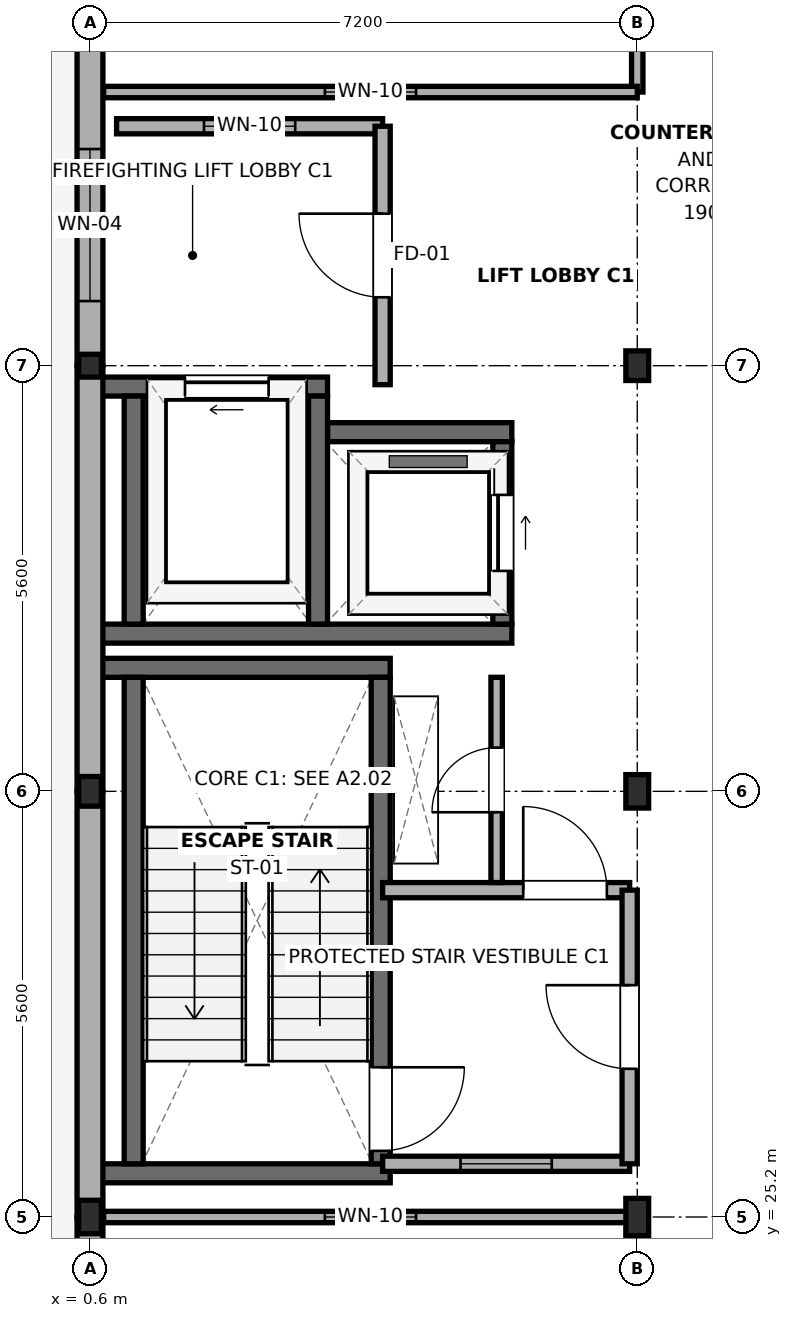
"""IFC4 building model, lengths in metres.
Left out: names, types, materials, properties, quantities, classifications, styles, units other than length and angle.
Written with IfcOpenShell. Run it as: python <this file> out.ifc"""

import sys

from ifc_helpers import new_model, si_unit, direction, frame, frame_2d, origin, origin_2d, place, context, subcontext, project, spatial, rectangle, i_section, extrude, element, fill, save


model = new_model("IFC4")
c1 = context("Model", 3, precision=1e-05, world=origin(), true_north=direction((0.0, 1.0)))
c2 = subcontext(c1, "Body", "Model", "MODEL_VIEW")
j1 = project(units=[si_unit("LENGTHUNIT", "METRE"), si_unit("PLANEANGLEUNIT", "RADIAN")], contexts=[c1])
p1 = place(None, origin())
s1 = spatial("IfcSite", under=j1, at=p1, CompositionType="ELEMENT")
p2 = place(p1, origin())
s2 = spatial("IfcBuilding", under=s1, at=p2, CompositionType="ELEMENT")
p3 = place(p2, frame((0.0, 0.0, 24.9)))
s3 = spatial("IfcBuildingStorey", under=s2, at=p3, CompositionType="ELEMENT", Elevation=24.9)
p4 = place(p3, frame((0.6, 25.2, 0.0), z_axis=(0.0, 0.0, 1.0), x_axis=(1.0, 0.0, 0.0)))
e1 = element("IfcColumn", 1, at=p4, inside=s3, PredefinedType="COLUMN", context=c2, shape_type="SweptSolid", body=[
    extrude(i_section(OverallWidth=0.3, OverallDepth=0.44, WebThickness=0.011, FlangeThickness=0.021, FilletRadius=0.027, at=origin_2d()), origin(), (0.0, 0.0, 1.0), 3.9),
])
p5 = place(p3, frame((0.6, 30.8, 0.0), z_axis=(0.0, 0.0, 1.0), x_axis=(1.0, 0.0, 0.0)))
e2 = element("IfcColumn", 2, at=p5, inside=s3, PredefinedType="COLUMN", context=c2, shape_type="SweptSolid", body=[
    extrude(i_section(OverallWidth=0.3, OverallDepth=0.39, WebThickness=0.011, FlangeThickness=0.019, FilletRadius=0.027, at=origin_2d()), origin(), (0.0, 0.0, 1.0), 3.9),
])
p6 = place(p3, frame((0.6, 36.4, 0.0), z_axis=(0.0, 0.0, 1.0), x_axis=(1.0, 0.0, 0.0)))
e3 = element("IfcColumn", 3, at=p6, inside=s3, PredefinedType="COLUMN", context=c2, shape_type="SweptSolid", body=[
    extrude(i_section(OverallWidth=0.3, OverallDepth=0.3, WebThickness=0.011, FlangeThickness=0.019, FilletRadius=0.027, at=origin_2d()), origin(), (0.0, 0.0, 1.0), 3.9),
])
p7 = place(p3, frame((7.8, 25.2, 0.0), z_axis=(0.0, 0.0, 1.0), x_axis=(1.0, 0.0, 0.0)))
e4 = element("IfcColumn", 4, at=p7, inside=s3, PredefinedType="COLUMN", context=c2, shape_type="SweptSolid", body=[
    extrude(i_section(OverallWidth=0.3, OverallDepth=0.49, WebThickness=0.012, FlangeThickness=0.023, FilletRadius=0.027, at=origin_2d()), origin(), (0.0, 0.0, 1.0), 3.9),
])
p8 = place(p3, frame((7.8, 30.8, 0.0), z_axis=(0.0, 0.0, 1.0), x_axis=(1.0, 0.0, 0.0)))
e5 = element("IfcColumn", 5, at=p8, inside=s3, PredefinedType="COLUMN", context=c2, shape_type="SweptSolid", body=[
    extrude(i_section(OverallWidth=0.3, OverallDepth=0.44, WebThickness=0.011, FlangeThickness=0.021, FilletRadius=0.027, at=origin_2d()), origin(), (0.0, 0.0, 1.0), 3.9),
])
p9 = place(p3, frame((7.8, 36.4, 0.0), z_axis=(0.0, 0.0, 1.0), x_axis=(1.0, 0.0, 0.0)))
e6 = element("IfcColumn", 6, at=p9, inside=s3, PredefinedType="COLUMN", context=c2, shape_type="SweptSolid", body=[
    extrude(i_section(OverallWidth=0.3, OverallDepth=0.39, WebThickness=0.011, FlangeThickness=0.019, FilletRadius=0.027, at=origin_2d()), origin(), (0.0, 0.0, 1.0), 3.9),
])
for number, where, z_axis, x_axis in (
    (7, (0.75, 25.775, 0.0), (0.0, 0.0, 1.0), (1.0, 0.0, 0.0)),
    (8, (0.75, 32.425, 0.0), (0.0, 0.0, 1.0), (1.0, 0.0, 0.0)),
):
    element("IfcWall", number, at=place(p3, frame(where, z_axis=z_axis, x_axis=x_axis)), inside=s3, PredefinedType="SHEAR", context=c2, shape_type="SweptSolid", body=[
        extrude(rectangle(XDim=3.8, YDim=0.25, at=frame_2d((1.9, 0.0))), origin(), (0.0, 0.0, 1.0), 3.72),
    ])
p10 = place(p3, frame((1.175, 25.9, 0.0), z_axis=(0.0, 0.0, 1.0), x_axis=(0.0, 1.0, 0.0)))
e9 = element("IfcWall", 9, at=p10, inside=s3, PredefinedType="SHEAR", context=c2, shape_type="SweptSolid", body=[
    extrude(rectangle(XDim=6.4, YDim=0.25, at=frame_2d((3.2, 0.0))), origin(), (0.0, 0.0, 1.0), 3.72),
])
p11 = place(p3, frame((4.425, 25.9, 0.0), z_axis=(0.0, 0.0, 1.0), x_axis=(0.0, 1.0, 0.0)))
e10 = element("IfcWall", 10, at=p11, inside=s3, PredefinedType="SHEAR", context=c2, shape_type="SweptSolid", body=[
    extrude(rectangle(XDim=6.4, YDim=0.25, at=frame_2d((3.2, 0.0))), origin(), (0.0, 0.0, 1.0), 3.72),
])
p12 = place(p11, frame((0.17, 0.0, 0.0)))
e11 = element("IfcOpeningElement", 11, at=p12, cuts=e10, PredefinedType="OPENING", context=c2, shape_type="SweptSolid", body=[
    extrude(rectangle(XDim=1.1, YDim=2.15, at=frame_2d((0.55, 1.075))), frame((0.0, 0.14, 0.0), z_axis=(0.0, -1.0, 0.0), x_axis=(1.0, 0.0, 0.0)), (0.0, 0.0, 1.0), 0.28),
])
p13 = place(p3, frame((0.75, 32.875, 0.0), z_axis=(0.0, 0.0, 1.0), x_axis=(1.0, 0.0, 0.0)))
e12 = element("IfcWall", 12, at=p13, inside=s3, PredefinedType="SHEAR", context=c2, shape_type="SweptSolid", body=[
    extrude(rectangle(XDim=5.4, YDim=0.25, at=frame_2d((2.7, 0.0))), origin(), (0.0, 0.0, 1.0), 3.72),
])
p14 = place(p3, frame((0.75, 36.125, 0.0), z_axis=(0.0, 0.0, 1.0), x_axis=(1.0, 0.0, 0.0)))
e13 = element("IfcWall", 13, at=p14, inside=s3, PredefinedType="SHEAR", context=c2, shape_type="SweptSolid", body=[
    extrude(rectangle(XDim=2.975, YDim=0.25, at=frame_2d((1.488, 0.0))), origin(), (0.0, 0.0, 1.0), 3.72),
])
p15 = place(p14, frame((1.1, 0.0, 0.0)))
e14 = element("IfcOpeningElement", 14, at=p15, cuts=e13, PredefinedType="OPENING", context=c2, shape_type="SweptSolid", body=[
    extrude(rectangle(XDim=1.1, YDim=2.15, at=frame_2d((0.55, 1.075))), frame((0.0, 0.14, 0.0), z_axis=(0.0, -1.0, 0.0), x_axis=(1.0, 0.0, 0.0)), (0.0, 0.0, 1.0), 0.28),
])
p16 = place(p3, frame((3.725, 35.525, 0.0), z_axis=(0.0, 0.0, 1.0), x_axis=(1.0, 0.0, 0.0)))
e15 = element("IfcWall", 15, at=p16, inside=s3, PredefinedType="SHEAR", context=c2, shape_type="SweptSolid", body=[
    extrude(rectangle(XDim=2.425, YDim=0.25, at=frame_2d((1.212, 0.0))), origin(), (0.0, 0.0, 1.0), 3.72),
])
for number, where, z_axis, x_axis in (
    (16, (1.175, 33.0, 0.0), (0.0, 0.0, 1.0), (0.0, 1.0, 0.0)),
    (17, (3.6, 33.0, 0.0), (0.0, 0.0, 1.0), (0.0, 1.0, 0.0)),
):
    element("IfcWall", number, at=place(p3, frame(where, z_axis=z_axis, x_axis=x_axis)), inside=s3, PredefinedType="SHEAR", context=c2, shape_type="SweptSolid", body=[
        extrude(rectangle(XDim=3.0, YDim=0.25, at=frame_2d((1.5, 0.0))), origin(), (0.0, 0.0, 1.0), 3.72),
    ])
p17 = place(p3, frame((6.025, 33.0, 0.0), z_axis=(0.0, 0.0, 1.0), x_axis=(0.0, 1.0, 0.0)))
e18 = element("IfcWall", 18, at=p17, inside=s3, PredefinedType="SHEAR", context=c2, shape_type="SweptSolid", body=[
    extrude(rectangle(XDim=2.4, YDim=0.25, at=frame_2d((1.2, 0.0))), origin(), (0.0, 0.0, 1.0), 3.72),
])
p18 = place(p17, frame((0.7, 0.0, 0.0)))
e19 = element("IfcOpeningElement", 19, at=p18, cuts=e18, PredefinedType="OPENING", context=c2, shape_type="SweptSolid", body=[
    extrude(rectangle(XDim=1.0, YDim=2.15, at=frame_2d((0.5, 1.075))), frame((0.0, 0.14, 0.0), z_axis=(0.0, -1.0, 0.0), x_axis=(1.0, 0.0, 0.0)), (0.0, 0.0, 1.0), 0.28),
])
p19 = place(p3, frame((0.6, 17.23, 0.0), z_axis=(0.0, 0.0, 1.0), x_axis=(0.0, 1.0, 0.0)))
e20 = element("IfcWall", 20, at=p19, inside=s3, PredefinedType="SOLIDWALL", context=c2, shape_type="SweptSolid", body=[
    extrude(rectangle(XDim=7.97, YDim=0.34, at=frame_2d((3.985, 0.0))), origin(), (0.0, 0.0, 1.0), 3.115),
])
p20 = place(p3, frame((0.6, 25.2, 0.0), z_axis=(0.0, 0.0, 1.0), x_axis=(0.0, 1.0, 0.0)))
e21 = element("IfcWall", 21, at=p20, inside=s3, PredefinedType="SOLIDWALL", context=c2, shape_type="SweptSolid", body=[
    extrude(rectangle(XDim=5.6, YDim=0.34, at=frame_2d((2.8, 0.0))), origin(), (0.0, 0.0, 1.0), 3.115),
])
p21 = place(p3, frame((0.6, 30.8, 0.0), z_axis=(0.0, 0.0, 1.0), x_axis=(0.0, 1.0, 0.0)))
e22 = element("IfcWall", 22, at=p21, inside=s3, PredefinedType="SOLIDWALL", context=c2, shape_type="SweptSolid", body=[
    extrude(rectangle(XDim=5.6, YDim=0.34, at=frame_2d((2.8, 0.0))), origin(), (0.0, 0.0, 1.0), 3.165),
])
p22 = place(p3, frame((0.6, 36.4, 0.0), z_axis=(0.0, 0.0, 1.0), x_axis=(0.0, 1.0, 0.0)))
e23 = element("IfcWall", 23, at=p22, inside=s3, PredefinedType="SOLIDWALL", context=c2, shape_type="SweptSolid", body=[
    extrude(rectangle(XDim=5.6, YDim=0.34, at=frame_2d((2.8, 0.0))), origin(), (0.0, 0.0, 1.0), 3.215),
])
p23 = place(p22, frame((0.85, 0.0, 0.9)))
e24 = element("IfcOpeningElement", 24, at=p23, cuts=e23, PredefinedType="OPENING", context=c2, shape_type="SweptSolid", body=[
    extrude(rectangle(XDim=2.0, YDim=1.8, at=frame_2d((1.0, 0.9))), frame((0.0, 0.185, 0.0), z_axis=(0.0, -1.0, 0.0), x_axis=(1.0, 0.0, 0.0)), (0.0, 0.0, 1.0), 0.37),
])
p24 = place(p3, frame((0.95, 39.55, 0.0), z_axis=(0.0, 0.0, 1.0), x_axis=(1.0, 0.0, 0.0)))
e25 = element("IfcWall", 25, at=p24, inside=s3, PredefinedType="PARTITIONING", context=c2, shape_type="SweptSolid", body=[
    extrude(rectangle(XDim=3.5, YDim=0.2, at=frame_2d((1.75, 0.0))), origin(), (0.0, 0.0, 1.0), 3.715),
])
p25 = place(p24, frame((1.15, 0.0, 0.95)))
e26 = element("IfcOpeningElement", 26, at=p25, cuts=e25, PredefinedType="OPENING", context=c2, shape_type="SweptSolid", body=[
    extrude(rectangle(XDim=1.2, YDim=1.5, at=frame_2d((0.6, 0.75))), frame((0.0, 0.115, 0.0), z_axis=(0.0, -1.0, 0.0), x_axis=(1.0, 0.0, 0.0)), (0.0, 0.0, 1.0), 0.23),
])
p26 = place(p3, frame((4.45, 36.15, 0.0), z_axis=(0.0, 0.0, 1.0), x_axis=(0.0, 1.0, 0.0)))
e27 = element("IfcWall", 27, at=p26, inside=s3, PredefinedType="PARTITIONING", context=c2, shape_type="SweptSolid", body=[
    extrude(rectangle(XDim=3.4, YDim=0.2, at=frame_2d((1.7, 0.0))), origin(), (0.0, 0.0, 1.0), 3.265),
])
p27 = place(p26, frame((1.15, 0.0, 0.0)))
e28 = element("IfcOpeningElement", 28, at=p27, cuts=e27, PredefinedType="OPENING", context=c2, shape_type="SweptSolid", body=[
    extrude(rectangle(XDim=1.1, YDim=2.15, at=frame_2d((0.55, 1.075))), frame((0.0, 0.115, 0.0), z_axis=(0.0, -1.0, 0.0), x_axis=(1.0, 0.0, 0.0)), (0.0, 0.0, 1.0), 0.23),
])
p28 = place(p3, frame((4.45, 25.9, 0.0), z_axis=(0.0, 0.0, 1.0), x_axis=(1.0, 0.0, 0.0)))
e29 = element("IfcWall", 29, at=p28, inside=s3, PredefinedType="PARTITIONING", context=c2, shape_type="SweptSolid", body=[
    extrude(rectangle(XDim=3.25, YDim=0.2, at=frame_2d((1.625, 0.0))), origin(), (0.0, 0.0, 1.0), 3.215),
])
p29 = place(p28, frame((1.025, 0.0, 0.95)))
e30 = element("IfcOpeningElement", 30, at=p29, cuts=e29, PredefinedType="OPENING", context=c2, shape_type="SweptSolid", body=[
    extrude(rectangle(XDim=1.2, YDim=1.5, at=frame_2d((0.6, 0.75))), frame((0.0, 0.115, 0.0), z_axis=(0.0, -1.0, 0.0), x_axis=(1.0, 0.0, 0.0)), (0.0, 0.0, 1.0), 0.23),
])
p30 = place(p3, frame((4.45, 29.5, 0.0), z_axis=(0.0, 0.0, 1.0), x_axis=(1.0, 0.0, 0.0)))
e31 = element("IfcWall", 31, at=p30, inside=s3, PredefinedType="PARTITIONING", context=c2, shape_type="SweptSolid", body=[
    extrude(rectangle(XDim=3.25, YDim=0.2, at=frame_2d((1.625, 0.0))), origin(), (0.0, 0.0, 1.0), 3.215),
])
p31 = place(p30, frame((1.85, 0.0, 0.0)))
e32 = element("IfcOpeningElement", 32, at=p31, cuts=e31, PredefinedType="OPENING", context=c2, shape_type="SweptSolid", body=[
    extrude(rectangle(XDim=1.1, YDim=2.15, at=frame_2d((0.55, 1.075))), frame((0.0, 0.115, 0.0), z_axis=(0.0, -1.0, 0.0), x_axis=(1.0, 0.0, 0.0)), (0.0, 0.0, 1.0), 0.23),
])
p32 = place(p3, frame((7.7, 25.9, 0.0), z_axis=(0.0, 0.0, 1.0), x_axis=(0.0, 1.0, 0.0)))
e33 = element("IfcWall", 33, at=p32, inside=s3, PredefinedType="PARTITIONING", context=c2, shape_type="SweptSolid", body=[
    extrude(rectangle(XDim=3.6, YDim=0.2, at=frame_2d((1.8, 0.0))), origin(), (0.0, 0.0, 1.0), 3.215),
])
p33 = place(p32, frame((1.25, 0.0, 0.0)))
e34 = element("IfcOpeningElement", 34, at=p33, cuts=e33, PredefinedType="OPENING", context=c2, shape_type="SweptSolid", body=[
    extrude(rectangle(XDim=1.1, YDim=2.15, at=frame_2d((0.55, 1.075))), frame((0.0, 0.115, 0.0), z_axis=(0.0, -1.0, 0.0), x_axis=(1.0, 0.0, 0.0)), (0.0, 0.0, 1.0), 0.23),
])
p34 = place(p3, frame((5.95, 29.6, 0.0), z_axis=(0.0, 0.0, 1.0), x_axis=(0.0, 1.0, 0.0)))
e35 = element("IfcWall", 35, at=p34, inside=s3, PredefinedType="PARTITIONING", context=c2, shape_type="SweptSolid", body=[
    extrude(rectangle(XDim=2.7, YDim=0.15, at=frame_2d((1.35, 0.0))), origin(), (0.0, 0.0, 1.0), 3.715),
])
p35 = place(p34, frame((0.925, 0.0, 0.0)))
e36 = element("IfcOpeningElement", 36, at=p35, cuts=e35, PredefinedType="OPENING", context=c2, shape_type="SweptSolid", body=[
    extrude(rectangle(XDim=0.85, YDim=2.1, at=frame_2d((0.425, 1.05))), frame((0.0, 0.09, 0.0), z_axis=(0.0, -1.0, 0.0), x_axis=(1.0, 0.0, 0.0)), (0.0, 0.0, 1.0), 0.18),
])
p36 = place(p3, frame((7.8, 17.56, 0.0), z_axis=(0.0, 0.0, 1.0), x_axis=(0.0, 1.0, 0.0)))
e37 = element("IfcWall", 37, at=p36, inside=s3, PredefinedType="PARTITIONING", context=c2, shape_type="SweptSolid", body=[
    extrude(rectangle(XDim=7.64, YDim=0.15, at=frame_2d((3.82, 0.0))), origin(), (0.0, 0.0, 1.0), 3.165),
])
p37 = place(p36, frame((3.295, 0.0, 0.0)))
e38 = element("IfcOpeningElement", 38, at=p37, cuts=e37, PredefinedType="OPENING", context=c2, shape_type="SweptSolid", body=[
    extrude(rectangle(XDim=1.05, YDim=2.15, at=frame_2d((0.525, 1.075))), frame((0.0, 0.09, 0.0), z_axis=(0.0, -1.0, 0.0), x_axis=(1.0, 0.0, 0.0)), (0.0, 0.0, 1.0), 0.18),
])
p38 = place(p3, frame((0.78, 25.2, 0.0), z_axis=(0.0, 0.0, 1.0), x_axis=(1.0, 0.0, 0.0)))
e39 = element("IfcWall", 39, at=p38, inside=s3, PredefinedType="PARTITIONING", context=c2, shape_type="SweptSolid", body=[
    extrude(rectangle(XDim=7.02, YDim=0.15, at=frame_2d((3.51, 0.0))), origin(), (0.0, 0.0, 1.0), 3.365),
])
p39 = place(p38, frame((2.91, 0.0, 0.95)))
e40 = element("IfcOpeningElement", 40, at=p39, cuts=e39, PredefinedType="OPENING", context=c2, shape_type="SweptSolid", body=[
    extrude(rectangle(XDim=1.2, YDim=1.5, at=frame_2d((0.6, 0.75))), frame((0.0, 0.09, 0.0), z_axis=(0.0, -1.0, 0.0), x_axis=(1.0, 0.0, 0.0)), (0.0, 0.0, 1.0), 0.18),
])
p40 = place(p3, frame((7.8, 40.0, 0.0), z_axis=(0.0, 0.0, 1.0), x_axis=(0.0, 1.0, 0.0)))
e41 = element("IfcWall", 41, at=p40, inside=s3, PredefinedType="PARTITIONING", context=c2, shape_type="SweptSolid", body=[
    extrude(rectangle(XDim=7.6, YDim=0.15, at=frame_2d((3.8, 0.0))), origin(), (0.0, 0.0, 1.0), 3.115),
])
p41 = place(p40, frame((3.325, 0.0, 0.0)))
e42 = element("IfcOpeningElement", 42, at=p41, cuts=e41, PredefinedType="OPENING", context=c2, shape_type="SweptSolid", body=[
    extrude(rectangle(XDim=0.95, YDim=2.15, at=frame_2d((0.475, 1.075))), frame((0.0, 0.09, 0.0), z_axis=(0.0, -1.0, 0.0), x_axis=(1.0, 0.0, 0.0)), (0.0, 0.0, 1.0), 0.18),
])
p42 = place(p3, frame((0.78, 40.0, 0.0), z_axis=(0.0, 0.0, 1.0), x_axis=(1.0, 0.0, 0.0)))
e43 = element("IfcWall", 43, at=p42, inside=s3, PredefinedType="PARTITIONING", context=c2, shape_type="SweptSolid", body=[
    extrude(rectangle(XDim=7.02, YDim=0.15, at=frame_2d((3.51, 0.0))), origin(), (0.0, 0.0, 1.0), 3.265),
])
p43 = place(p42, frame((2.91, 0.0, 0.95)))
e44 = element("IfcOpeningElement", 44, at=p43, cuts=e43, PredefinedType="OPENING", context=c2, shape_type="SweptSolid", body=[
    extrude(rectangle(XDim=1.2, YDim=1.5, at=frame_2d((0.6, 0.75))), frame((0.0, 0.09, 0.0), z_axis=(0.0, -1.0, 0.0), x_axis=(1.0, 0.0, 0.0)), (0.0, 0.0, 1.0), 0.18),
])
p44 = place(p23, origin())
e45 = element("IfcWindow", 45, at=p44, inside=s3, PartitioningType="SINGLE_PANEL", PredefinedType="WINDOW", context=c2, shape_type="SweptSolid", body=[
    extrude(rectangle(XDim=2.0, YDim=1.8, at=frame_2d((1.0, 0.9))), frame((0.0, 0.03, 0.0), z_axis=(0.0, -1.0, 0.0), x_axis=(1.0, 0.0, 0.0)), (0.0, 0.0, 1.0), 0.06),
])
fill(e24, e45)
p45 = place(p12, frame((1.1, 0.0, 0.0), z_axis=(0.0, 0.0, 1.0), x_axis=(-1.0, 0.0, 0.0)))
e46 = element("IfcDoor", 46, at=p45, inside=s3, OperationType="SINGLE_SWING_LEFT", PredefinedType="DOOR", context=c2, shape_type="SweptSolid", body=[
    extrude(rectangle(XDim=1.1, YDim=2.15, at=frame_2d((0.55, 1.075))), frame((0.0, 0.025, 0.0), z_axis=(0.0, -1.0, 0.0), x_axis=(1.0, 0.0, 0.0)), (0.0, 0.0, 1.0), 0.05),
])
fill(e11, e46)
p46 = place(p15, origin())
e47 = element("IfcDoor", 47, at=p46, inside=s3, OperationType="SLIDING_TO_LEFT", PredefinedType="DOOR", context=c2, shape_type="SweptSolid", body=[
    extrude(rectangle(XDim=1.1, YDim=2.15, at=frame_2d((0.55, 1.075))), frame((0.0, 0.025, 0.0), z_axis=(0.0, -1.0, 0.0), x_axis=(1.0, 0.0, 0.0)), (0.0, 0.0, 1.0), 0.05),
])
fill(e14, e47)
p47 = place(p18, frame((1.0, 0.0, 0.0), z_axis=(0.0, 0.0, 1.0), x_axis=(-1.0, 0.0, 0.0)))
e48 = element("IfcDoor", 48, at=p47, inside=s3, OperationType="SLIDING_TO_RIGHT", PredefinedType="DOOR", context=c2, shape_type="SweptSolid", body=[
    extrude(rectangle(XDim=1.0, YDim=2.15, at=frame_2d((0.5, 1.075))), frame((0.0, 0.025, 0.0), z_axis=(0.0, -1.0, 0.0), x_axis=(1.0, 0.0, 0.0)), (0.0, 0.0, 1.0), 0.05),
])
fill(e19, e48)
p48 = place(p25, origin())
e49 = element("IfcWindow", 49, at=p48, inside=s3, PartitioningType="SINGLE_PANEL", PredefinedType="WINDOW", context=c2, shape_type="SweptSolid", body=[
    extrude(rectangle(XDim=1.2, YDim=1.5, at=frame_2d((0.6, 0.75))), frame((0.0, 0.03, 0.0), z_axis=(0.0, -1.0, 0.0), x_axis=(1.0, 0.0, 0.0)), (0.0, 0.0, 1.0), 0.06),
])
fill(e26, e49)
p49 = place(p27, origin())
e50 = element("IfcDoor", 50, at=p49, inside=s3, OperationType="SINGLE_SWING_RIGHT", PredefinedType="DOOR", context=c2, shape_type="SweptSolid", body=[
    extrude(rectangle(XDim=1.1, YDim=2.15, at=frame_2d((0.55, 1.075))), frame((0.0, 0.025, 0.0), z_axis=(0.0, -1.0, 0.0), x_axis=(1.0, 0.0, 0.0)), (0.0, 0.0, 1.0), 0.05),
])
fill(e28, e50)
p50 = place(p29, origin())
e51 = element("IfcWindow", 51, at=p50, inside=s3, PartitioningType="SINGLE_PANEL", PredefinedType="WINDOW", context=c2, shape_type="SweptSolid", body=[
    extrude(rectangle(XDim=1.2, YDim=1.5, at=frame_2d((0.6, 0.75))), frame((0.0, 0.03, 0.0), z_axis=(0.0, -1.0, 0.0), x_axis=(1.0, 0.0, 0.0)), (0.0, 0.0, 1.0), 0.06),
])
fill(e30, e51)
p51 = place(p31, origin())
e52 = element("IfcDoor", 52, at=p51, inside=s3, OperationType="SINGLE_SWING_LEFT", PredefinedType="DOOR", context=c2, shape_type="SweptSolid", body=[
    extrude(rectangle(XDim=1.1, YDim=2.15, at=frame_2d((0.55, 1.075))), frame((0.0, 0.025, 0.0), z_axis=(0.0, -1.0, 0.0), x_axis=(1.0, 0.0, 0.0)), (0.0, 0.0, 1.0), 0.05),
])
fill(e32, e52)
p52 = place(p33, origin())
e53 = element("IfcDoor", 53, at=p52, inside=s3, OperationType="SINGLE_SWING_RIGHT", PredefinedType="DOOR", context=c2, shape_type="SweptSolid", body=[
    extrude(rectangle(XDim=1.1, YDim=2.15, at=frame_2d((0.55, 1.075))), frame((0.0, 0.025, 0.0), z_axis=(0.0, -1.0, 0.0), x_axis=(1.0, 0.0, 0.0)), (0.0, 0.0, 1.0), 0.05),
])
fill(e34, e53)
p53 = place(p35, origin())
e54 = element("IfcDoor", 54, at=p53, inside=s3, OperationType="SINGLE_SWING_LEFT", PredefinedType="DOOR", context=c2, shape_type="SweptSolid", body=[
    extrude(rectangle(XDim=0.85, YDim=2.1, at=frame_2d((0.425, 1.05))), frame((0.0, 0.025, 0.0), z_axis=(0.0, -1.0, 0.0), x_axis=(1.0, 0.0, 0.0)), (0.0, 0.0, 1.0), 0.05),
])
fill(e36, e54)
p54 = place(p39, origin())
e55 = element("IfcWindow", 55, at=p54, inside=s3, PartitioningType="SINGLE_PANEL", PredefinedType="WINDOW", context=c2, shape_type="SweptSolid", body=[
    extrude(rectangle(XDim=1.2, YDim=1.5, at=frame_2d((0.6, 0.75))), frame((0.0, 0.03, 0.0), z_axis=(0.0, -1.0, 0.0), x_axis=(1.0, 0.0, 0.0)), (0.0, 0.0, 1.0), 0.06),
])
fill(e40, e55)
p55 = place(p43, origin())
e56 = element("IfcWindow", 56, at=p55, inside=s3, PartitioningType="SINGLE_PANEL", PredefinedType="WINDOW", context=c2, shape_type="SweptSolid", body=[
    extrude(rectangle(XDim=1.2, YDim=1.5, at=frame_2d((0.6, 0.75))), frame((0.0, 0.03, 0.0), z_axis=(0.0, -1.0, 0.0), x_axis=(1.0, 0.0, 0.0)), (0.0, 0.0, 1.0), 0.06),
])
fill(e44, e56)
save(model, sys.argv[1])
